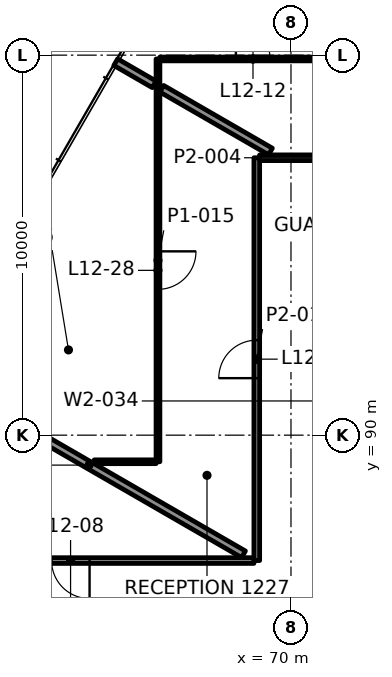
"""IFC4 building model, lengths in metres.
Left out: names, types, materials, properties, quantities, classifications, styles, units other than length and angle.
Written with IfcOpenShell. Run it as: python <this file> out.ifc"""

import sys

from ifc_helpers import new_model, si_unit, direction, frame, frame_2d, origin, place, context, subcontext, project, spatial, rectangle, extrude, element, fill, save


model = new_model("IFC4")
c1 = context("Model", 3, precision=1e-05, world=origin(), true_north=direction((0.0, 1.0)))
c2 = subcontext(c1, "Body", "Model", "MODEL_VIEW")
j1 = project(units=[si_unit("LENGTHUNIT", "METRE"), si_unit("PLANEANGLEUNIT", "RADIAN")], contexts=[c1])
p1 = place(None, origin())
s1 = spatial("IfcSite", under=j1, at=p1, CompositionType="ELEMENT")
p2 = place(p1, origin())
s2 = spatial("IfcBuilding", under=s1, at=p2, CompositionType="ELEMENT")
p3 = place(p2, frame((0.0, 0.0, 56.8)))
s3 = spatial("IfcBuildingStorey", under=s2, at=p3, CompositionType="ELEMENT", Elevation=56.8)
p4 = place(p3, frame((69.025, 86.7, 0.0), z_axis=(0.0, 0.0, 1.0), x_axis=(-1.0, 0.0, 0.0)))
e1 = element("IfcWall", 1, at=p4, inside=s3, PredefinedType="PARTITIONING", context=c2, shape_type="SweptSolid", body=[
    extrude(rectangle(XDim=9.649, YDim=0.15, at=frame_2d((4.825, 0.0))), origin(), (0.0, 0.0, 1.0), 3.4),
])
p5 = place(p4, frame((4.325, 0.0, 0.0)))
e2 = element("IfcOpeningElement", 2, at=p5, cuts=e1, PredefinedType="OPENING", context=c2, shape_type="SweptSolid", body=[
    extrude(rectangle(XDim=1.0, YDim=2.1, at=frame_2d((0.5, 1.05))), frame((0.0, 0.085, 0.0), z_axis=(0.0, -1.0, 0.0), x_axis=(1.0, 0.0, 0.0)), (0.0, 0.0, 1.0), 0.17),
])
p6 = place(p3, frame((64.823, 89.3, 0.0), z_axis=(0.0, 0.0, 1.0), x_axis=(1.0, 0.0, 0.0)))
e3 = element("IfcWall", 3, at=p6, inside=s3, PredefinedType="PARTITIONING", context=c2, shape_type="SweptSolid", body=[
    extrude(rectangle(XDim=1.627, YDim=0.1, at=frame_2d((0.813, 0.0))), origin(), (0.0, 0.0, 1.0), 3.4),
])
p7 = place(p3, frame((69.175, 97.3, 0.0), z_axis=(0.0, 0.0, 1.0), x_axis=(1.0, 0.0, 0.0)))
e4 = element("IfcWall", 4, at=p7, inside=s3, PredefinedType="PARTITIONING", context=c2, shape_type="SweptSolid", body=[
    extrude(rectangle(XDim=4.85, YDim=0.15, at=frame_2d((2.425, 0.0))), origin(), (0.0, 0.0, 1.0), 3.4),
])
p8 = place(p7, frame((2.107, 0.0, 0.0)))
e5 = element("IfcOpeningElement", 5, at=p8, cuts=e4, PredefinedType="OPENING", context=c2, shape_type="SweptSolid", body=[
    extrude(rectangle(XDim=1.0, YDim=2.1, at=frame_2d((0.5, 1.05))), frame((0.0, 0.085, 0.0), z_axis=(0.0, -1.0, 0.0), x_axis=(1.0, 0.0, 0.0)), (0.0, 0.0, 1.0), 0.17),
])
p9 = place(p3, frame((66.551, 99.9, 0.0), z_axis=(0.0, 0.0, 1.0), x_axis=(1.0, 0.0, 0.0)))
e6 = element("IfcWall", 6, at=p9, inside=s3, PredefinedType="PARTITIONING", context=c2, shape_type="SweptSolid", body=[
    extrude(rectangle(XDim=4.899, YDim=0.1, at=frame_2d((2.45, 0.0))), origin(), (0.0, 0.0, 1.0), 3.165),
])
p10 = place(p9, frame((2.0, 0.0, 0.0)))
e7 = element("IfcOpeningElement", 7, at=p10, cuts=e6, PredefinedType="OPENING", context=c2, shape_type="SweptSolid", body=[
    extrude(rectangle(XDim=0.9, YDim=2.1, at=frame_2d((0.45, 1.05))), frame((0.0, 0.06, 0.0), z_axis=(0.0, -1.0, 0.0), x_axis=(1.0, 0.0, 0.0)), (0.0, 0.0, 1.0), 0.12),
])
p11 = place(p3, frame((69.1, 86.7, 0.0), z_axis=(0.0, 0.0, 1.0), x_axis=(0.0, 1.0, 0.0)))
e8 = element("IfcWall", 8, at=p11, inside=s3, PredefinedType="PARTITIONING", context=c2, shape_type="SweptSolid", body=[
    extrude(rectangle(XDim=10.6, YDim=0.15, at=frame_2d((5.3, 0.0))), origin(), (0.0, 0.0, 1.0), 3.4),
])
p12 = place(p11, frame((4.8, 0.0, 0.0)))
e9 = element("IfcOpeningElement", 9, at=p12, cuts=e8, PredefinedType="OPENING", context=c2, shape_type="SweptSolid", body=[
    extrude(rectangle(XDim=1.0, YDim=2.1, at=frame_2d((0.5, 1.05))), frame((0.0, 0.085, 0.0), z_axis=(0.0, -1.0, 0.0), x_axis=(1.0, 0.0, 0.0)), (0.0, 0.0, 1.0), 0.17),
])
p13 = place(p3, frame((66.5, 99.899, 0.0), z_axis=(0.0, 0.0, 1.0), x_axis=(0.0, -1.0, 0.0)))
e10 = element("IfcWall", 10, at=p13, inside=s3, PredefinedType="PARTITIONING", context=c2, shape_type="SweptSolid", body=[
    extrude(rectangle(XDim=10.599, YDim=0.1, at=frame_2d((5.3, 0.0))), origin(), (0.0, 0.0, 1.0), 3.165),
])
p14 = place(p13, frame((5.062, 0.0, 0.0)))
e11 = element("IfcOpeningElement", 11, at=p14, cuts=e10, PredefinedType="OPENING", context=c2, shape_type="SweptSolid", body=[
    extrude(rectangle(XDim=1.0, YDim=2.1, at=frame_2d((0.5, 1.05))), frame((0.0, 0.06, 0.0), z_axis=(0.0, -1.0, 0.0), x_axis=(1.0, 0.0, 0.0)), (0.0, 0.0, 1.0), 0.12),
])
p15 = place(p3, frame((69.46, 97.465, 0.0), z_axis=(0.0, 0.0, 1.0), x_axis=(-0.866027998537, 0.499995505729, 0.0)))
e12 = element("IfcWall", 12, at=p15, inside=s3, PredefinedType="PARTITIONING", context=c2, shape_type="SweptSolid", body=[
    extrude(rectangle(XDim=3.302, YDim=0.2, at=frame_2d((1.651, 0.0))), origin(), (0.0, 0.0, 1.0), 3.4),
])
p16 = place(p3, frame((68.751, 86.865, 0.0), z_axis=(0.0, 0.0, 1.0), x_axis=(-0.8660257632, 0.499999377474, 0.0)))
e13 = element("IfcWall", 13, at=p16, inside=s3, PredefinedType="PARTITIONING", context=c2, shape_type="SweptSolid", body=[
    extrude(rectangle(XDim=9.387, YDim=0.2, at=frame_2d((4.693, 0.0))), origin(), (0.0, 0.0, 1.0), 3.165),
])
p17 = place(p3, frame((66.4, 99.231, 0.0), z_axis=(0.0, 0.0, 1.0), x_axis=(-0.86600796803, 0.500030198396, 0.0)))
e14 = element("IfcWall", 14, at=p17, inside=s3, PredefinedType="PARTITIONING", context=c2, shape_type="SweptSolid", body=[
    extrude(rectangle(XDim=1.167, YDim=0.2, at=frame_2d((0.584, 0.0))), origin(), (0.0, 0.0, 1.0), 3.165),
])
p18 = place(p5, origin())
e15 = element("IfcDoor", 15, at=p18, inside=s3, OperationType="SINGLE_SWING_LEFT", PredefinedType="DOOR", context=c2, shape_type="SweptSolid", body=[
    extrude(rectangle(XDim=1.0, YDim=2.1, at=frame_2d((0.5, 1.05))), frame((0.0, 0.025, 0.0), z_axis=(0.0, -1.0, 0.0), x_axis=(1.0, 0.0, 0.0)), (0.0, 0.0, 1.0), 0.05),
])
fill(e2, e15)
p19 = place(p10, origin())
e16 = element("IfcDoor", 16, at=p19, inside=s3, OperationType="SINGLE_SWING_RIGHT", PredefinedType="DOOR", context=c2, shape_type="SweptSolid", body=[
    extrude(rectangle(XDim=0.9, YDim=2.1, at=frame_2d((0.45, 1.05))), frame((0.0, 0.025, 0.0), z_axis=(0.0, -1.0, 0.0), x_axis=(1.0, 0.0, 0.0)), (0.0, 0.0, 1.0), 0.05),
])
fill(e7, e16)
p20 = place(p12, origin())
e17 = element("IfcDoor", 17, at=p20, inside=s3, OperationType="SINGLE_SWING_RIGHT", PredefinedType="DOOR", context=c2, shape_type="SweptSolid", body=[
    extrude(rectangle(XDim=1.0, YDim=2.1, at=frame_2d((0.5, 1.05))), frame((0.0, 0.025, 0.0), z_axis=(0.0, -1.0, 0.0), x_axis=(1.0, 0.0, 0.0)), (0.0, 0.0, 1.0), 0.05),
])
fill(e9, e17)
p21 = place(p14, origin())
e18 = element("IfcDoor", 18, at=p21, inside=s3, OperationType="SINGLE_SWING_RIGHT", PredefinedType="DOOR", context=c2, shape_type="SweptSolid", body=[
    extrude(rectangle(XDim=1.0, YDim=2.1, at=frame_2d((0.5, 1.05))), frame((0.0, 0.025, 0.0), z_axis=(0.0, -1.0, 0.0), x_axis=(1.0, 0.0, 0.0)), (0.0, 0.0, 1.0), 0.05),
])
fill(e11, e18)
save(model, sys.argv[1])
